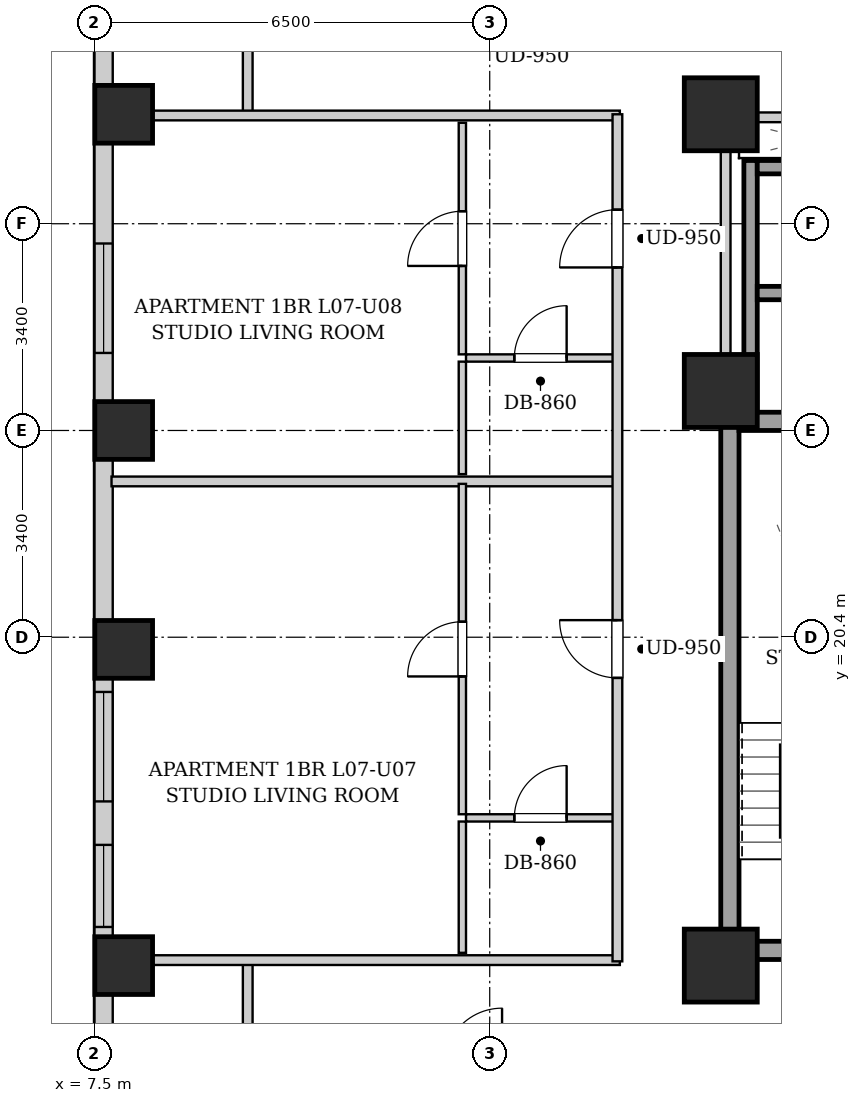
"""IFC4 building model, lengths in metres.
Left out: names, types, materials, properties, quantities, classifications, styles, units other than length and angle.
Written with IfcOpenShell. Run it as: python <this file> out.ifc"""

import sys

from ifc_helpers import new_model, si_unit, direction, frame, frame_2d, origin, origin_2d, place, context, subcontext, project, spatial, rectangle, extrude, element, fill, save


model = new_model("IFC4")
c1 = context("Model", 3, precision=1e-05, world=origin(), true_north=direction((0.0, 1.0)))
c2 = subcontext(c1, "Body", "Model", "MODEL_VIEW")
j1 = project(units=[si_unit("LENGTHUNIT", "METRE"), si_unit("PLANEANGLEUNIT", "RADIAN")], contexts=[c1])
p1 = place(None, origin())
s1 = spatial("IfcSite", under=j1, at=p1, CompositionType="ELEMENT")
p2 = place(p1, origin())
s2 = spatial("IfcBuilding", under=s1, at=p2, CompositionType="ELEMENT")
p3 = place(p2, frame((0.0, 0.0, 32.2)))
s3 = spatial("IfcBuildingStorey", under=s2, at=p3, CompositionType="ELEMENT", Elevation=32.2)
for number, where, z_axis, x_axis in (
    (1, (7.98, 15.0, 0.0), (0.0, 0.0, 1.0), (1.0, 0.0, 0.0)),
    (2, (7.98, 20.2, 0.0), (0.0, 0.0, 1.0), (1.0, 0.0, 0.0)),
    (3, (7.98, 23.8, 0.0), (0.0, 0.0, 1.0), (1.0, 0.0, 0.0)),
    (4, (7.98, 29.0, 0.0), (0.0, 0.0, 1.0), (1.0, 0.0, 0.0)),
):
    element("IfcColumn", number, at=place(p3, frame(where, z_axis=z_axis, x_axis=x_axis)), inside=s3, PredefinedType="COLUMN", context=c2, shape_type="SweptSolid", body=[
        extrude(rectangle(XDim=0.95, YDim=0.95, at=origin_2d()), origin(), (0.0, 0.0, 1.0), 3.2),
    ])
for number, where, z_axis, x_axis in (
    (5, (17.8, 15.0, 0.0), (0.0, 0.0, 1.0), (1.0, 0.0, 0.0)),
    (6, (17.8, 29.0, 0.0), (0.0, 0.0, 1.0), (1.0, 0.0, 0.0)),
    (7, (17.8, 24.45, 0.0), (0.0, 0.0, 1.0), (1.0, 0.0, 0.0)),
):
    element("IfcColumn", number, at=place(p3, frame(where, z_axis=z_axis, x_axis=x_axis)), inside=s3, PredefinedType="COLUMN", context=c2, shape_type="SweptSolid", body=[
        extrude(rectangle(XDim=1.2, YDim=1.2, at=origin_2d()), origin(), (0.0, 0.0, 1.0), 3.2),
    ])
p4 = place(p3, frame((7.65, 2.5, 0.0), z_axis=(0.0, 0.0, 1.0), x_axis=(0.0, 1.0, 0.0)))
e8 = element("IfcWall", 8, at=p4, inside=s3, PredefinedType="SOLIDWALL", context=c2, shape_type="SweptSolid", body=[
    extrude(rectangle(XDim=42.6, YDim=0.3, at=frame_2d((21.3, 0.0))), origin(), (0.0, 0.0, 1.0), 1.975),
])
p5 = place(p4, frame((3.15, 0.0, 0.55)))
e9 = element("IfcOpeningElement", 9, at=p5, cuts=e8, PredefinedType="OPENING", context=c2, shape_type="SweptSolid", body=[
    extrude(rectangle(XDim=1.8, YDim=1.2, at=frame_2d((0.9, 0.6))), frame((0.0, 0.16, 0.0), z_axis=(0.0, -1.0, 0.0), x_axis=(1.0, 0.0, 0.0)), (0.0, 0.0, 1.0), 0.32),
])
p6 = place(p4, frame((1.185, 0.0, 0.55)))
e10 = element("IfcOpeningElement", 10, at=p6, cuts=e8, PredefinedType="OPENING", context=c2, shape_type="SweptSolid", body=[
    extrude(rectangle(XDim=1.35, YDim=1.2, at=frame_2d((0.675, 0.6))), frame((0.0, 0.16, 0.0), z_axis=(0.0, -1.0, 0.0), x_axis=(1.0, 0.0, 0.0)), (0.0, 0.0, 1.0), 0.32),
])
p7 = place(p4, frame((37.135, 0.0, 0.55)))
e11 = element("IfcOpeningElement", 11, at=p7, cuts=e8, PredefinedType="OPENING", context=c2, shape_type="SweptSolid", body=[
    extrude(rectangle(XDim=1.8, YDim=1.2, at=frame_2d((0.9, 0.6))), frame((0.0, 0.16, 0.0), z_axis=(0.0, -1.0, 0.0), x_axis=(1.0, 0.0, 0.0)), (0.0, 0.0, 1.0), 0.32),
])
p8 = place(p4, frame((31.55, 0.0, 0.55)))
e12 = element("IfcOpeningElement", 12, at=p8, cuts=e8, PredefinedType="OPENING", context=c2, shape_type="SweptSolid", body=[
    extrude(rectangle(XDim=1.35, YDim=1.2, at=frame_2d((0.675, 0.6))), frame((0.0, 0.16, 0.0), z_axis=(0.0, -1.0, 0.0), x_axis=(1.0, 0.0, 0.0)), (0.0, 0.0, 1.0), 0.32),
])
p9 = place(p4, frame((15.2, 0.0, 0.55)))
e13 = element("IfcOpeningElement", 13, at=p9, cuts=e8, PredefinedType="OPENING", context=c2, shape_type="SweptSolid", body=[
    extrude(rectangle(XDim=1.8, YDim=1.2, at=frame_2d((0.9, 0.6))), frame((0.0, 0.16, 0.0), z_axis=(0.0, -1.0, 0.0), x_axis=(1.0, 0.0, 0.0)), (0.0, 0.0, 1.0), 0.32),
])
p10 = place(p4, frame((13.135, 0.0, 0.55)))
e14 = element("IfcOpeningElement", 14, at=p10, cuts=e8, PredefinedType="OPENING", context=c2, shape_type="SweptSolid", body=[
    extrude(rectangle(XDim=1.35, YDim=1.2, at=frame_2d((0.675, 0.6))), frame((0.0, 0.16, 0.0), z_axis=(0.0, -1.0, 0.0), x_axis=(1.0, 0.0, 0.0)), (0.0, 0.0, 1.0), 0.32),
])
p11 = place(p4, frame((22.575, 0.0, 0.55)))
e15 = element("IfcOpeningElement", 15, at=p11, cuts=e8, PredefinedType="OPENING", context=c2, shape_type="SweptSolid", body=[
    extrude(rectangle(XDim=1.8, YDim=1.2, at=frame_2d((0.9, 0.6))), frame((0.0, 0.16, 0.0), z_axis=(0.0, -1.0, 0.0), x_axis=(1.0, 0.0, 0.0)), (0.0, 0.0, 1.0), 0.32),
])
p12 = place(p3, frame((17.95, 15.1, 0.0), z_axis=(0.0, 0.0, 1.0), x_axis=(0.0, 1.0, 0.0)))
e16 = element("IfcWall", 16, at=p12, inside=s3, PredefinedType="SHEAR", context=c2, shape_type="SweptSolid", body=[
    extrude(rectangle(XDim=9.0, YDim=0.3, at=frame_2d((4.5, 0.0))), origin(), (0.0, 0.0, 1.0), 2.94),
])
p13 = place(p3, frame((18.1, 23.95, 0.0), z_axis=(0.0, 0.0, 1.0), x_axis=(1.0, 0.0, 0.0)))
e17 = element("IfcWall", 17, at=p13, inside=s3, PredefinedType="SHEAR", context=c2, shape_type="SweptSolid", body=[
    extrude(rectangle(XDim=2.85, YDim=0.3, at=frame_2d((1.425, 0.0))), origin(), (0.0, 0.0, 1.0), 2.94),
])
p14 = place(p3, frame((18.1, 15.25, 0.0), z_axis=(0.0, 0.0, 1.0), x_axis=(1.0, 0.0, 0.0)))
e18 = element("IfcWall", 18, at=p14, inside=s3, PredefinedType="SHEAR", context=c2, shape_type="SweptSolid", body=[
    extrude(rectangle(XDim=2.85, YDim=0.3, at=frame_2d((1.425, 0.0))), origin(), (0.0, 0.0, 1.0), 2.94),
])
p15 = place(p14, frame((0.86, 0.0, 0.0)))
e19 = element("IfcOpeningElement", 19, at=p15, cuts=e18, PredefinedType="OPENING", context=c2, shape_type="SweptSolid", body=[
    extrude(rectangle(XDim=1.1, YDim=2.05, at=frame_2d((0.55, 1.025))), frame((0.0, 0.16, 0.0), z_axis=(0.0, -1.0, 0.0), x_axis=(1.0, 0.0, 0.0)), (0.0, 0.0, 1.0), 0.32),
])
p16 = place(p3, frame((18.29, 24.1, 0.0), z_axis=(0.0, 0.0, 1.0), x_axis=(0.0, 1.0, 0.0)))
e20 = element("IfcWall", 20, at=p16, inside=s3, PredefinedType="SHEAR", context=c2, shape_type="SweptSolid", body=[
    extrude(rectangle(XDim=4.14, YDim=0.22, at=frame_2d((2.07, 0.0))), origin(), (0.0, 0.0, 1.0), 2.94),
])
for number, where, z_axis, x_axis in (
    (21, (18.4, 26.06, 0.0), (0.0, 0.0, 1.0), (1.0, 0.0, 0.0)),
    (22, (18.4, 28.13, 0.0), (0.0, 0.0, 1.0), (1.0, 0.0, 0.0)),
):
    element("IfcWall", number, at=place(p3, frame(where, z_axis=z_axis, x_axis=x_axis)), inside=s3, PredefinedType="SHEAR", context=c2, shape_type="SweptSolid", body=[
        extrude(rectangle(XDim=1.9, YDim=0.22, at=frame_2d((0.95, 0.0))), origin(), (0.0, 0.0, 1.0), 2.94),
    ])
p17 = place(p3, frame((17.88, 24.12, 0.0), z_axis=(0.0, 0.0, 1.0), x_axis=(0.0, 1.0, 0.0)))
e23 = element("IfcWall", 23, at=p17, inside=s3, PredefinedType="PARTITIONING", context=c2, shape_type="SweptSolid", body=[
    extrude(rectangle(XDim=4.76, YDim=0.16, at=frame_2d((2.38, 0.0))), origin(), (0.0, 0.0, 1.0), 2.94),
])
p18 = place(p3, frame((17.96, 28.95, 0.0), z_axis=(0.0, 0.0, 1.0), x_axis=(1.0, 0.0, 0.0)))
e24 = element("IfcWall", 24, at=p18, inside=s3, PredefinedType="PARTITIONING", context=c2, shape_type="SweptSolid", body=[
    extrude(rectangle(XDim=4.29, YDim=0.16, at=frame_2d((2.145, 0.0))), origin(), (0.0, 0.0, 1.0), 2.155),
])
p19 = place(p18, frame((1.57, 0.0, 0.0)))
e25 = element("IfcOpeningElement", 25, at=p19, cuts=e24, PredefinedType="OPENING", context=c2, shape_type="SweptSolid", body=[
    extrude(rectangle(XDim=0.86, YDim=2.05, at=frame_2d((0.43, 1.025))), frame((0.0, 0.09, 0.0), z_axis=(0.0, -1.0, 0.0), x_axis=(1.0, 0.0, 0.0)), (0.0, 0.0, 1.0), 0.18),
])
for number, where, z_axis, x_axis in (
    (26, (10.02, 13.35, 0.0), (0.0, 0.0, 1.0), (0.0, 1.0, 0.0)),
    (27, (10.02, 28.98, 0.0), (0.0, 0.0, 1.0), (0.0, 1.0, 0.0)),
):
    element("IfcWall", number, at=place(p3, frame(where, z_axis=z_axis, x_axis=x_axis)), inside=s3, PredefinedType="PARTITIONING", context=c2, shape_type="SweptSolid", body=[
        extrude(rectangle(XDim=1.74, YDim=0.16, at=frame_2d((0.87, 0.0))), origin(), (0.0, 0.0, 1.0), 2.94),
    ])
for number, where, z_axis, x_axis in (
    (28, (7.78, 15.09, 0.0), (0.0, 0.0, 1.0), (1.0, 0.0, 0.0)),
    (29, (7.78, 28.98, 0.0), (0.0, 0.0, 1.0), (1.0, 0.0, 0.0)),
):
    element("IfcWall", number, at=place(p3, frame(where, z_axis=z_axis, x_axis=x_axis)), inside=s3, PredefinedType="PARTITIONING", context=c2, shape_type="SweptSolid", body=[
        extrude(rectangle(XDim=8.36, YDim=0.16, at=frame_2d((4.18, 0.0))), origin(), (0.0, 0.0, 1.0), 2.155),
    ])
p20 = place(p3, frame((7.78, 22.962, 0.0), z_axis=(0.0, 0.0, 1.0), x_axis=(1.0, 0.0, 0.0)))
e30 = element("IfcWall", 30, at=p20, inside=s3, PredefinedType="PARTITIONING", context=c2, shape_type="SweptSolid", body=[
    extrude(rectangle(XDim=8.28, YDim=0.16, at=frame_2d((4.14, 0.0))), origin(), (0.0, 0.0, 1.0), 2.94),
])
p21 = place(p3, frame((13.61, 17.429, 0.0), z_axis=(0.0, 0.0, 1.0), x_axis=(1.0, 0.0, 0.0)))
e31 = element("IfcWall", 31, at=p21, inside=s3, PredefinedType="PARTITIONING", context=c2, shape_type="SweptSolid", body=[
    extrude(rectangle(XDim=2.45, YDim=0.12, at=frame_2d((1.225, 0.0))), origin(), (0.0, 0.0, 1.0), 2.94),
])
p22 = place(p21, frame((0.795, 0.0, 0.0)))
e32 = element("IfcOpeningElement", 32, at=p22, cuts=e31, PredefinedType="OPENING", context=c2, shape_type="SweptSolid", body=[
    extrude(rectangle(XDim=0.86, YDim=2.05, at=frame_2d((0.43, 1.025))), frame((0.0, 0.07, 0.0), z_axis=(0.0, -1.0, 0.0), x_axis=(1.0, 0.0, 0.0)), (0.0, 0.0, 1.0), 0.14),
])
p23 = place(p3, frame((13.55, 15.21, 0.0), z_axis=(0.0, 0.0, 1.0), x_axis=(0.0, 1.0, 0.0)))
e33 = element("IfcWall", 33, at=p23, inside=s3, PredefinedType="PARTITIONING", context=c2, shape_type="SweptSolid", body=[
    extrude(rectangle(XDim=2.159, YDim=0.12, at=frame_2d((1.08, 0.0))), origin(), (0.0, 0.0, 1.0), 2.94),
])
p24 = place(p3, frame((13.55, 17.489, 0.0), z_axis=(0.0, 0.0, 1.0), x_axis=(0.0, 1.0, 0.0)))
e34 = element("IfcWall", 34, at=p24, inside=s3, PredefinedType="PARTITIONING", context=c2, shape_type="SweptSolid", body=[
    extrude(rectangle(XDim=5.433, YDim=0.12, at=frame_2d((2.717, 0.0))), origin(), (0.0, 0.0, 1.0), 2.94),
])
p25 = place(p24, frame((2.266, 0.0, 0.0)))
e35 = element("IfcOpeningElement", 35, at=p25, cuts=e34, PredefinedType="OPENING", context=c2, shape_type="SweptSolid", body=[
    extrude(rectangle(XDim=0.9, YDim=2.05, at=frame_2d((0.45, 1.025))), frame((0.0, 0.07, 0.0), z_axis=(0.0, -1.0, 0.0), x_axis=(1.0, 0.0, 0.0)), (0.0, 0.0, 1.0), 0.14),
])
p26 = place(p3, frame((13.61, 24.992, 0.0), z_axis=(0.0, 0.0, 1.0), x_axis=(1.0, 0.0, 0.0)))
e36 = element("IfcWall", 36, at=p26, inside=s3, PredefinedType="PARTITIONING", context=c2, shape_type="SweptSolid", body=[
    extrude(rectangle(XDim=2.45, YDim=0.12, at=frame_2d((1.225, 0.0))), origin(), (0.0, 0.0, 1.0), 2.94),
])
p27 = place(p26, frame((0.795, 0.0, 0.0)))
e37 = element("IfcOpeningElement", 37, at=p27, cuts=e36, PredefinedType="OPENING", context=c2, shape_type="SweptSolid", body=[
    extrude(rectangle(XDim=0.86, YDim=2.05, at=frame_2d((0.43, 1.025))), frame((0.0, 0.07, 0.0), z_axis=(0.0, -1.0, 0.0), x_axis=(1.0, 0.0, 0.0)), (0.0, 0.0, 1.0), 0.14),
])
p28 = place(p3, frame((13.55, 23.082, 0.0), z_axis=(0.0, 0.0, 1.0), x_axis=(0.0, 1.0, 0.0)))
e38 = element("IfcWall", 38, at=p28, inside=s3, PredefinedType="PARTITIONING", context=c2, shape_type="SweptSolid", body=[
    extrude(rectangle(XDim=1.85, YDim=0.12, at=frame_2d((0.925, 0.0))), origin(), (0.0, 0.0, 1.0), 2.94),
])
p29 = place(p3, frame((13.55, 25.052, 0.0), z_axis=(0.0, 0.0, 1.0), x_axis=(0.0, 1.0, 0.0)))
e39 = element("IfcWall", 39, at=p29, inside=s3, PredefinedType="PARTITIONING", context=c2, shape_type="SweptSolid", body=[
    extrude(rectangle(XDim=3.808, YDim=0.12, at=frame_2d((1.904, 0.0))), origin(), (0.0, 0.0, 1.0), 2.94),
])
p30 = place(p29, frame((1.454, 0.0, 0.0)))
e40 = element("IfcOpeningElement", 40, at=p30, cuts=e39, PredefinedType="OPENING", context=c2, shape_type="SweptSolid", body=[
    extrude(rectangle(XDim=0.9, YDim=2.05, at=frame_2d((0.45, 1.025))), frame((0.0, 0.07, 0.0), z_axis=(0.0, -1.0, 0.0), x_axis=(1.0, 0.0, 0.0)), (0.0, 0.0, 1.0), 0.14),
])
p31 = place(p3, frame((16.1, 15.07, 0.0), z_axis=(0.0, 0.0, 1.0), x_axis=(0.0, 1.0, 0.0)))
e41 = element("IfcWall", 41, at=p31, inside=s3, PredefinedType="PARTITIONING", context=c2, shape_type="SweptSolid", body=[
    extrude(rectangle(XDim=13.93, YDim=0.16, at=frame_2d((6.965, 0.0))), origin(), (0.0, 0.0, 1.0), 2.94),
])
p32 = place(p31, frame((4.661, 0.0, 0.0)))
e42 = element("IfcOpeningElement", 42, at=p32, cuts=e41, PredefinedType="OPENING", context=c2, shape_type="SweptSolid", body=[
    extrude(rectangle(XDim=0.95, YDim=2.1, at=frame_2d((0.475, 1.05))), frame((0.0, 0.09, 0.0), z_axis=(0.0, -1.0, 0.0), x_axis=(1.0, 0.0, 0.0)), (0.0, 0.0, 1.0), 0.18),
])
p33 = place(p31, frame((11.411, 0.0, 0.0)))
e43 = element("IfcOpeningElement", 43, at=p33, cuts=e41, PredefinedType="OPENING", context=c2, shape_type="SweptSolid", body=[
    extrude(rectangle(XDim=0.95, YDim=2.1, at=frame_2d((0.475, 1.05))), frame((0.0, 0.09, 0.0), z_axis=(0.0, -1.0, 0.0), x_axis=(1.0, 0.0, 0.0)), (0.0, 0.0, 1.0), 0.18),
])
p34 = place(p22, origin())
e44 = element("IfcDoor", 44, at=p34, inside=s3, OperationType="SINGLE_SWING_RIGHT", PredefinedType="DOOR", context=c2, shape_type="SweptSolid", body=[
    extrude(rectangle(XDim=0.86, YDim=2.05, at=frame_2d((0.43, 1.025))), frame((0.0, 0.025, 0.0), z_axis=(0.0, -1.0, 0.0), x_axis=(1.0, 0.0, 0.0)), (0.0, 0.0, 1.0), 0.05),
])
fill(e32, e44)
p35 = place(p25, origin())
e45 = element("IfcDoor", 45, at=p35, inside=s3, OperationType="SINGLE_SWING_LEFT", PredefinedType="DOOR", context=c2, shape_type="SweptSolid", body=[
    extrude(rectangle(XDim=0.9, YDim=2.05, at=frame_2d((0.45, 1.025))), frame((0.0, 0.025, 0.0), z_axis=(0.0, -1.0, 0.0), x_axis=(1.0, 0.0, 0.0)), (0.0, 0.0, 1.0), 0.05),
])
fill(e35, e45)
p36 = place(p27, origin())
e46 = element("IfcDoor", 46, at=p36, inside=s3, OperationType="SINGLE_SWING_RIGHT", PredefinedType="DOOR", context=c2, shape_type="SweptSolid", body=[
    extrude(rectangle(XDim=0.86, YDim=2.05, at=frame_2d((0.43, 1.025))), frame((0.0, 0.025, 0.0), z_axis=(0.0, -1.0, 0.0), x_axis=(1.0, 0.0, 0.0)), (0.0, 0.0, 1.0), 0.05),
])
fill(e37, e46)
p37 = place(p30, origin())
e47 = element("IfcDoor", 47, at=p37, inside=s3, OperationType="SINGLE_SWING_LEFT", PredefinedType="DOOR", context=c2, shape_type="SweptSolid", body=[
    extrude(rectangle(XDim=0.9, YDim=2.05, at=frame_2d((0.45, 1.025))), frame((0.0, 0.025, 0.0), z_axis=(0.0, -1.0, 0.0), x_axis=(1.0, 0.0, 0.0)), (0.0, 0.0, 1.0), 0.05),
])
fill(e40, e47)
p38 = place(p32, origin())
e48 = element("IfcDoor", 48, at=p38, inside=s3, OperationType="SINGLE_SWING_RIGHT", PredefinedType="DOOR", context=c2, shape_type="SweptSolid", body=[
    extrude(rectangle(XDim=0.95, YDim=2.1, at=frame_2d((0.475, 1.05))), frame((0.0, 0.025, 0.0), z_axis=(0.0, -1.0, 0.0), x_axis=(1.0, 0.0, 0.0)), (0.0, 0.0, 1.0), 0.05),
])
fill(e42, e48)
p39 = place(p33, origin())
e49 = element("IfcDoor", 49, at=p39, inside=s3, OperationType="SINGLE_SWING_LEFT", PredefinedType="DOOR", context=c2, shape_type="SweptSolid", body=[
    extrude(rectangle(XDim=0.95, YDim=2.1, at=frame_2d((0.475, 1.05))), frame((0.0, 0.025, 0.0), z_axis=(0.0, -1.0, 0.0), x_axis=(1.0, 0.0, 0.0)), (0.0, 0.0, 1.0), 0.05),
])
fill(e43, e49)
p40 = place(p9, origin())
e50 = element("IfcWindow", 50, at=p40, inside=s3, PartitioningType="DOUBLE_PANEL_VERTICAL", PredefinedType="WINDOW", context=c2, shape_type="SweptSolid", body=[
    extrude(rectangle(XDim=1.8, YDim=1.2, at=frame_2d((0.9, 0.6))), frame((0.0, 0.03, 0.0), z_axis=(0.0, -1.0, 0.0), x_axis=(1.0, 0.0, 0.0)), (0.0, 0.0, 1.0), 0.06),
])
fill(e13, e50)
p41 = place(p10, origin())
e51 = element("IfcWindow", 51, at=p41, inside=s3, PartitioningType="SINGLE_PANEL", PredefinedType="WINDOW", context=c2, shape_type="SweptSolid", body=[
    extrude(rectangle(XDim=1.35, YDim=1.2, at=frame_2d((0.675, 0.6))), frame((0.0, 0.03, 0.0), z_axis=(0.0, -1.0, 0.0), x_axis=(1.0, 0.0, 0.0)), (0.0, 0.0, 1.0), 0.06),
])
fill(e14, e51)
p42 = place(p11, origin())
e52 = element("IfcWindow", 52, at=p42, inside=s3, PartitioningType="DOUBLE_PANEL_VERTICAL", PredefinedType="WINDOW", context=c2, shape_type="SweptSolid", body=[
    extrude(rectangle(XDim=1.8, YDim=1.2, at=frame_2d((0.9, 0.6))), frame((0.0, 0.03, 0.0), z_axis=(0.0, -1.0, 0.0), x_axis=(1.0, 0.0, 0.0)), (0.0, 0.0, 1.0), 0.06),
])
fill(e15, e52)
save(model, sys.argv[1])
